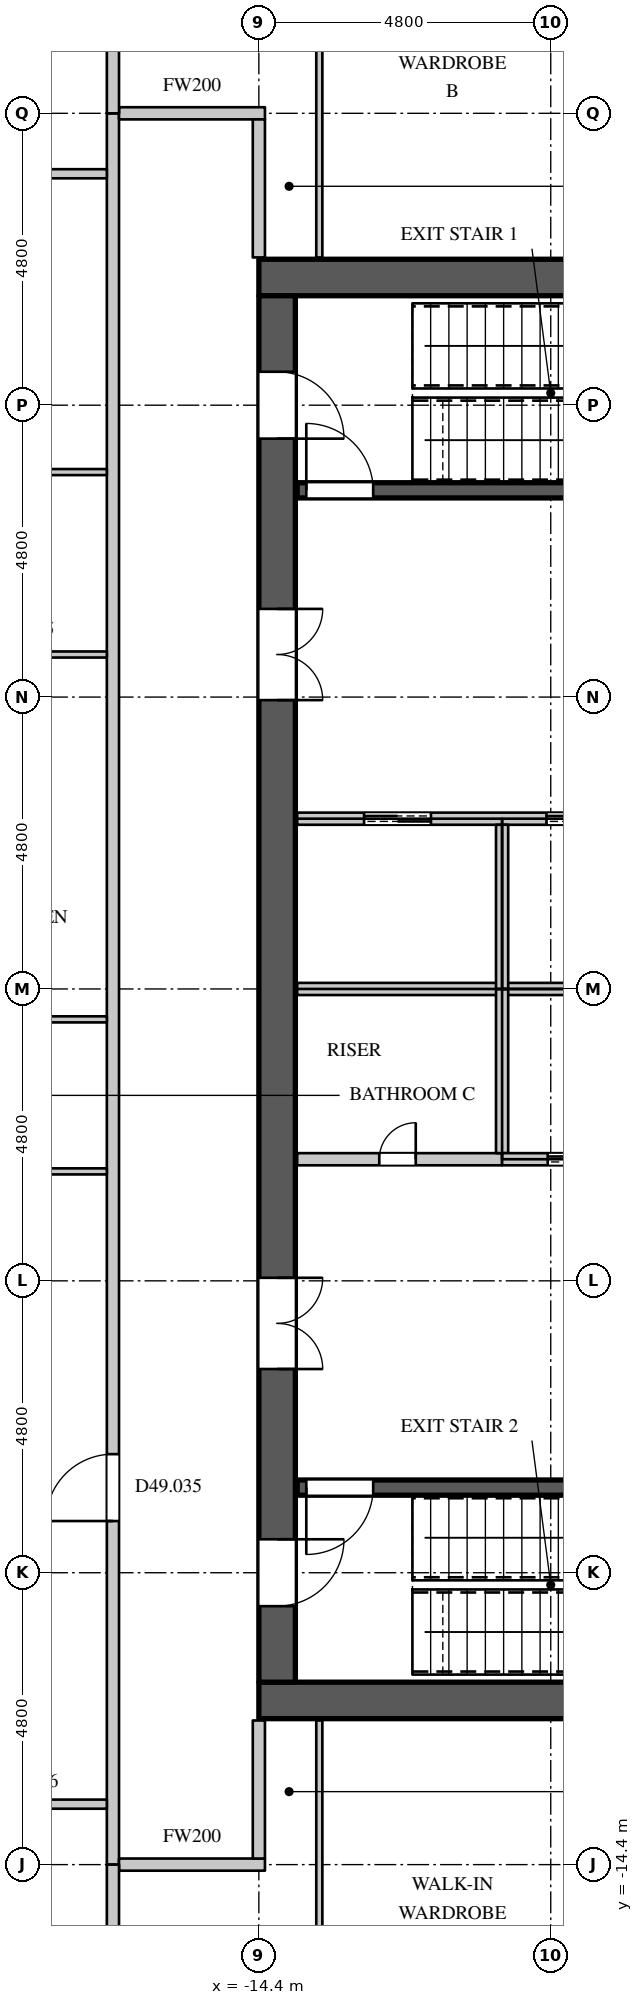
"""IFC4 building model, lengths in metres.
Left out: names, types, materials, properties, quantities, classifications, styles, units other than length and angle.
Written with IfcOpenShell. Run it as: python <this file> out.ifc"""

import sys

from ifc_helpers import new_model, si_unit, direction, frame, frame_2d, origin, place, context, subcontext, project, spatial, rectangle, extrude, element, fill, save


model = new_model("IFC4")
c1 = context("Model", 3, precision=1e-05, world=origin(), true_north=direction((0.0, 1.0)))
c2 = subcontext(c1, "Body", "Model", "MODEL_VIEW")
j1 = project(units=[si_unit("LENGTHUNIT", "METRE"), si_unit("PLANEANGLEUNIT", "RADIAN")], contexts=[c1])
p1 = place(None, origin())
s1 = spatial("IfcSite", under=j1, at=p1, CompositionType="ELEMENT")
p2 = place(p1, origin())
s2 = spatial("IfcBuilding", under=s1, at=p2, CompositionType="ELEMENT")
p3 = place(p2, frame((0.0, 0.0, 213.9)))
s3 = spatial("IfcBuildingStorey", under=s2, at=p3, CompositionType="ELEMENT", Elevation=213.9)
for number, where, z_axis, x_axis in (
    (1, (-14.4, 11.7, 0.0), (0.0, 0.0, 1.0), (1.0, 0.0, 0.0)),
    (2, (-14.4, -11.7, 0.0), (0.0, 0.0, 1.0), (1.0, 0.0, 0.0)),
):
    element("IfcWall", number, at=place(p3, frame(where, z_axis=z_axis, x_axis=x_axis)), inside=s3, PredefinedType="SHEAR", context=c2, shape_type="SweptSolid", body=[
        extrude(rectangle(XDim=28.8, YDim=0.6, at=frame_2d((14.4, 0.0))), origin(), (0.0, 0.0, 1.0), 4.2),
    ])
p4 = place(p3, frame((-14.1, -11.4, 0.0), z_axis=(0.0, 0.0, 1.0), x_axis=(0.0, 1.0, 0.0)))
e3 = element("IfcWall", 3, at=p4, inside=s3, PredefinedType="SHEAR", context=c2, shape_type="SweptSolid", body=[
    extrude(rectangle(XDim=22.8, YDim=0.6, at=frame_2d((11.4, 0.0))), origin(), (0.0, 0.0, 1.0), 4.2),
])
p5 = place(p4, frame((20.45, 0.0, 0.0)))
e4 = element("IfcOpeningElement", 4, at=p5, cuts=e3, PredefinedType="OPENING", context=c2, shape_type="SweptSolid", body=[
    extrude(rectangle(XDim=1.1, YDim=2.2, at=frame_2d((0.55, 1.1))), frame((0.0, 0.31, 0.0), z_axis=(0.0, -1.0, 0.0), x_axis=(1.0, 0.0, 0.0)), (0.0, 0.0, 1.0), 0.62),
])
p6 = place(p4, frame((1.25, 0.0, 0.0)))
e5 = element("IfcOpeningElement", 5, at=p6, cuts=e3, PredefinedType="OPENING", context=c2, shape_type="SweptSolid", body=[
    extrude(rectangle(XDim=1.1, YDim=2.2, at=frame_2d((0.55, 1.1))), frame((0.0, 0.31, 0.0), z_axis=(0.0, -1.0, 0.0), x_axis=(1.0, 0.0, 0.0)), (0.0, 0.0, 1.0), 0.62),
])
p7 = place(p4, frame((16.15, 0.0, 0.0)))
e6 = element("IfcOpeningElement", 6, at=p7, cuts=e3, PredefinedType="OPENING", context=c2, shape_type="SweptSolid", body=[
    extrude(rectangle(XDim=1.5, YDim=2.4, at=frame_2d((0.75, 1.2))), frame((0.0, 0.31, 0.0), z_axis=(0.0, -1.0, 0.0), x_axis=(1.0, 0.0, 0.0)), (0.0, 0.0, 1.0), 0.62),
])
p8 = place(p4, frame((5.15, 0.0, 0.0)))
e7 = element("IfcOpeningElement", 7, at=p8, cuts=e3, PredefinedType="OPENING", context=c2, shape_type="SweptSolid", body=[
    extrude(rectangle(XDim=1.5, YDim=2.4, at=frame_2d((0.75, 1.2))), frame((0.0, 0.31, 0.0), z_axis=(0.0, -1.0, 0.0), x_axis=(1.0, 0.0, 0.0)), (0.0, 0.0, 1.0), 0.62),
])
p9 = place(p3, frame((-16.8, -14.4, 0.0), z_axis=(0.0, 0.0, 1.0), x_axis=(0.0, 1.0, 0.0)))
e8 = element("IfcWall", 8, at=p9, inside=s3, PredefinedType="PARTITIONING", context=c2, shape_type="SweptSolid", body=[
    extrude(rectangle(XDim=28.8, YDim=0.2, at=frame_2d((14.4, 0.0))), origin(), (0.0, 0.0, 1.0), 3.95),
])
p10 = place(p9, frame((5.65, 0.0, 0.0)))
e9 = element("IfcOpeningElement", 9, at=p10, cuts=e8, PredefinedType="OPENING", context=c2, shape_type="SweptSolid", body=[
    extrude(rectangle(XDim=1.1, YDim=2.4, at=frame_2d((0.55, 1.2))), frame((0.0, 0.11, 0.0), z_axis=(0.0, -1.0, 0.0), x_axis=(1.0, 0.0, 0.0)), (0.0, 0.0, 1.0), 0.22),
])
for number, where, z_axis, x_axis in (
    (10, (-16.7, -14.4, 0.0), (0.0, 0.0, 1.0), (1.0, 0.0, 0.0)),
    (11, (-16.7, 14.4, 0.0), (0.0, 0.0, 1.0), (1.0, 0.0, 0.0)),
):
    element("IfcWall", number, at=place(p3, frame(where, z_axis=z_axis, x_axis=x_axis)), inside=s3, PredefinedType="PARTITIONING", context=c2, shape_type="SweptSolid", body=[
        extrude(rectangle(XDim=2.4, YDim=0.2, at=frame_2d((1.2, 0.0))), origin(), (0.0, 0.0, 1.0), 3.95),
    ])
for number, where, z_axis, x_axis in (
    (12, (-14.4, -14.3, 0.0), (0.0, 0.0, 1.0), (0.0, 1.0, 0.0)),
    (13, (-14.4, 12.03, 0.0), (0.0, 0.0, 1.0), (0.0, 1.0, 0.0)),
):
    element("IfcWall", number, at=place(p3, frame(where, z_axis=z_axis, x_axis=x_axis)), inside=s3, PredefinedType="PARTITIONING", context=c2, shape_type="SweptSolid", body=[
        extrude(rectangle(XDim=2.27, YDim=0.2, at=frame_2d((1.135, 0.0))), origin(), (0.0, 0.0, 1.0), 3.95),
    ])
p11 = place(p3, frame((-25.224, -13.406, 0.0), z_axis=(0.0, 0.0, 1.0), x_axis=(1.0, 0.0, 0.0)))
e14 = element("IfcWall", 14, at=p11, inside=s3, PredefinedType="PARTITIONING", context=c2, shape_type="SweptSolid", body=[
    extrude(rectangle(XDim=8.324, YDim=0.15, at=frame_2d((4.162, 0.0))), origin(), (0.0, 0.0, 1.0), 3.95),
])
p12 = place(p11, frame((6.143, 0.0, 0.0)))
e15 = element("IfcOpeningElement", 15, at=p12, cuts=e14, PredefinedType="OPENING", context=c2, shape_type="SweptSolid", body=[
    extrude(rectangle(XDim=0.95, YDim=2.2, at=frame_2d((0.475, 1.1))), frame((0.0, 0.085, 0.0), z_axis=(0.0, -1.0, 0.0), x_axis=(1.0, 0.0, 0.0)), (0.0, 0.0, 1.0), 0.17),
])
p13 = place(p3, frame((-25.224, 13.406, 0.0), z_axis=(0.0, 0.0, 1.0), x_axis=(1.0, 0.0, 0.0)))
e16 = element("IfcWall", 16, at=p13, inside=s3, PredefinedType="PARTITIONING", context=c2, shape_type="SweptSolid", body=[
    extrude(rectangle(XDim=8.324, YDim=0.15, at=frame_2d((4.162, 0.0))), origin(), (0.0, 0.0, 1.0), 3.95),
])
p14 = place(p13, frame((1.793, 0.0, 0.0)))
e17 = element("IfcOpeningElement", 17, at=p14, cuts=e16, PredefinedType="OPENING", context=c2, shape_type="SweptSolid", body=[
    extrude(rectangle(XDim=1.5, YDim=2.2, at=frame_2d((0.75, 1.1))), frame((0.0, 0.085, 0.0), z_axis=(0.0, -1.0, 0.0), x_axis=(1.0, 0.0, 0.0)), (0.0, 0.0, 1.0), 0.17),
])
for number, where, z_axis, x_axis in (
    (18, (-16.8, -19.803, 0.0), (0.0, 0.0, 1.0), (0.0, 1.0, 0.0)),
    (19, (-16.8, 14.4, 0.0), (0.0, 0.0, 1.0), (0.0, 1.0, 0.0)),
):
    element("IfcWall", number, at=place(p3, frame(where, z_axis=z_axis, x_axis=x_axis)), inside=s3, PredefinedType="PARTITIONING", context=c2, shape_type="SweptSolid", body=[
        extrude(rectangle(XDim=5.403, YDim=0.2, at=frame_2d((2.702, 0.0))), origin(), (0.0, 0.0, 1.0), 3.95),
    ])
p15 = place(p3, frame((-13.77, -2.8, 0.0), z_axis=(0.0, 0.0, 1.0), x_axis=(1.0, 0.0, 0.0)))
e20 = element("IfcWall", 20, at=p15, inside=s3, PredefinedType="PARTITIONING", context=c2, shape_type="SweptSolid", body=[
    extrude(rectangle(XDim=3.37, YDim=0.2, at=frame_2d((1.685, 0.0))), origin(), (0.0, 0.0, 1.0), 3.95),
])
p16 = place(p15, frame((1.35, 0.0, 0.0)))
e21 = element("IfcOpeningElement", 21, at=p16, cuts=e20, PredefinedType="OPENING", context=c2, shape_type="SweptSolid", body=[
    extrude(rectangle(XDim=0.6, YDim=2.0, at=frame_2d((0.3, 1.0))), frame((0.0, 0.11, 0.0), z_axis=(0.0, -1.0, 0.0), x_axis=(1.0, 0.0, 0.0)), (0.0, 0.0, 1.0), 0.22),
])
p17 = place(p3, frame((-13.77, 0.0, 0.0), z_axis=(0.0, 0.0, 1.0), x_axis=(1.0, 0.0, 0.0)))
e22 = element("IfcWall", 22, at=p17, inside=s3, PredefinedType="PARTITIONING", context=c2, shape_type="SweptSolid", body=[
    extrude(rectangle(XDim=21.57, YDim=0.2, at=frame_2d((10.785, 0.0))), origin(), (0.0, 0.0, 1.0), 3.95),
])
p18 = place(p3, frame((-13.77, 2.8, 0.0), z_axis=(0.0, 0.0, 1.0), x_axis=(1.0, 0.0, 0.0)))
e23 = element("IfcWall", 23, at=p18, inside=s3, PredefinedType="PARTITIONING", context=c2, shape_type="SweptSolid", body=[
    extrude(rectangle(XDim=5.97, YDim=0.2, at=frame_2d((2.985, 0.0))), origin(), (0.0, 0.0, 1.0), 3.95),
])
p19 = place(p18, frame((1.1, 0.0, 0.0)))
e24 = element("IfcOpeningElement", 24, at=p19, cuts=e23, PredefinedType="OPENING", context=c2, shape_type="SweptSolid", body=[
    extrude(rectangle(XDim=1.1, YDim=2.2, at=frame_2d((0.55, 1.1))), frame((0.0, 0.11, 0.0), z_axis=(0.0, -1.0, 0.0), x_axis=(1.0, 0.0, 0.0)), (0.0, 0.0, 1.0), 0.22),
])
p20 = place(p18, frame((4.1, 0.0, 0.0)))
e25 = element("IfcOpeningElement", 25, at=p20, cuts=e23, PredefinedType="OPENING", context=c2, shape_type="SweptSolid", body=[
    extrude(rectangle(XDim=1.1, YDim=2.2, at=frame_2d((0.55, 1.1))), frame((0.0, 0.11, 0.0), z_axis=(0.0, -1.0, 0.0), x_axis=(1.0, 0.0, 0.0)), (0.0, 0.0, 1.0), 0.22),
])
p21 = place(p3, frame((-10.4, -2.7, 0.0), z_axis=(0.0, 0.0, 1.0), x_axis=(0.0, 1.0, 0.0)))
e26 = element("IfcWall", 26, at=p21, inside=s3, PredefinedType="PARTITIONING", context=c2, shape_type="SweptSolid", body=[
    extrude(rectangle(XDim=2.7, YDim=0.2, at=frame_2d((1.35, 0.0))), origin(), (0.0, 0.0, 1.0), 3.95),
])
p22 = place(p3, frame((-10.4, -2.8, 0.0), z_axis=(0.0, 0.0, 1.0), x_axis=(1.0, 0.0, 0.0)))
e27 = element("IfcWall", 27, at=p22, inside=s3, PredefinedType="PARTITIONING", context=c2, shape_type="SweptSolid", body=[
    extrude(rectangle(XDim=18.2, YDim=0.2, at=frame_2d((9.1, 0.0))), origin(), (0.0, 0.0, 1.0), 3.95),
])
p23 = place(p22, frame((0.75, 0.0, 0.0)))
e28 = element("IfcOpeningElement", 28, at=p23, cuts=e27, PredefinedType="OPENING", context=c2, shape_type="SweptSolid", body=[
    extrude(rectangle(XDim=1.1, YDim=2.2, at=frame_2d((0.55, 1.1))), frame((0.0, 0.11, 0.0), z_axis=(0.0, -1.0, 0.0), x_axis=(1.0, 0.0, 0.0)), (0.0, 0.0, 1.0), 0.22),
])
p24 = place(p22, frame((3.35, 0.0, 0.0)))
e29 = element("IfcOpeningElement", 29, at=p24, cuts=e27, PredefinedType="OPENING", context=c2, shape_type="SweptSolid", body=[
    extrude(rectangle(XDim=1.1, YDim=2.2, at=frame_2d((0.55, 1.1))), frame((0.0, 0.11, 0.0), z_axis=(0.0, -1.0, 0.0), x_axis=(1.0, 0.0, 0.0)), (0.0, 0.0, 1.0), 0.22),
])
p25 = place(p22, frame((5.95, 0.0, 0.0)))
e30 = element("IfcOpeningElement", 30, at=p25, cuts=e27, PredefinedType="OPENING", context=c2, shape_type="SweptSolid", body=[
    extrude(rectangle(XDim=1.1, YDim=2.2, at=frame_2d((0.55, 1.1))), frame((0.0, 0.11, 0.0), z_axis=(0.0, -1.0, 0.0), x_axis=(1.0, 0.0, 0.0)), (0.0, 0.0, 1.0), 0.22),
])
p26 = place(p22, frame((8.55, 0.0, 0.0)))
e31 = element("IfcOpeningElement", 31, at=p26, cuts=e27, PredefinedType="OPENING", context=c2, shape_type="SweptSolid", body=[
    extrude(rectangle(XDim=1.1, YDim=2.2, at=frame_2d((0.55, 1.1))), frame((0.0, 0.11, 0.0), z_axis=(0.0, -1.0, 0.0), x_axis=(1.0, 0.0, 0.0)), (0.0, 0.0, 1.0), 0.22),
])
p27 = place(p22, frame((11.15, 0.0, 0.0)))
e32 = element("IfcOpeningElement", 32, at=p27, cuts=e27, PredefinedType="OPENING", context=c2, shape_type="SweptSolid", body=[
    extrude(rectangle(XDim=1.1, YDim=2.2, at=frame_2d((0.55, 1.1))), frame((0.0, 0.11, 0.0), z_axis=(0.0, -1.0, 0.0), x_axis=(1.0, 0.0, 0.0)), (0.0, 0.0, 1.0), 0.22),
])
p28 = place(p22, frame((13.75, 0.0, 0.0)))
e33 = element("IfcOpeningElement", 33, at=p28, cuts=e27, PredefinedType="OPENING", context=c2, shape_type="SweptSolid", body=[
    extrude(rectangle(XDim=1.1, YDim=2.2, at=frame_2d((0.55, 1.1))), frame((0.0, 0.11, 0.0), z_axis=(0.0, -1.0, 0.0), x_axis=(1.0, 0.0, 0.0)), (0.0, 0.0, 1.0), 0.22),
])
p29 = place(p22, frame((16.35, 0.0, 0.0)))
e34 = element("IfcOpeningElement", 34, at=p29, cuts=e27, PredefinedType="OPENING", context=c2, shape_type="SweptSolid", body=[
    extrude(rectangle(XDim=1.1, YDim=2.2, at=frame_2d((0.55, 1.1))), frame((0.0, 0.11, 0.0), z_axis=(0.0, -1.0, 0.0), x_axis=(1.0, 0.0, 0.0)), (0.0, 0.0, 1.0), 0.22),
])
p30 = place(p3, frame((-10.4, 0.0, 0.0), z_axis=(0.0, 0.0, 1.0), x_axis=(0.0, 1.0, 0.0)))
e35 = element("IfcWall", 35, at=p30, inside=s3, PredefinedType="PARTITIONING", context=c2, shape_type="SweptSolid", body=[
    extrude(rectangle(XDim=2.7, YDim=0.2, at=frame_2d((1.35, 0.0))), origin(), (0.0, 0.0, 1.0), 3.95),
])
p31 = place(p3, frame((-13.77, -8.2, 0.0), z_axis=(0.0, 0.0, 1.0), x_axis=(1.0, 0.0, 0.0)))
e36 = element("IfcWall", 36, at=p31, inside=s3, PredefinedType="SHEAR", context=c2, shape_type="SweptSolid", body=[
    extrude(rectangle(XDim=8.495, YDim=0.25, at=frame_2d((4.248, 0.0))), origin(), (0.0, 0.0, 1.0), 3.95),
])
p32 = place(p31, frame((0.15, 0.0, 0.0)))
e37 = element("IfcOpeningElement", 37, at=p32, cuts=e36, PredefinedType="OPENING", context=c2, shape_type="SweptSolid", body=[
    extrude(rectangle(XDim=1.1, YDim=2.2, at=frame_2d((0.55, 1.1))), frame((0.0, 0.135, 0.0), z_axis=(0.0, -1.0, 0.0), x_axis=(1.0, 0.0, 0.0)), (0.0, 0.0, 1.0), 0.27),
])
p33 = place(p3, frame((-13.77, 8.2, 0.0), z_axis=(0.0, 0.0, 1.0), x_axis=(1.0, 0.0, 0.0)))
e38 = element("IfcWall", 38, at=p33, inside=s3, PredefinedType="SHEAR", context=c2, shape_type="SweptSolid", body=[
    extrude(rectangle(XDim=8.495, YDim=0.25, at=frame_2d((4.248, 0.0))), origin(), (0.0, 0.0, 1.0), 3.95),
])
p34 = place(p33, frame((0.15, 0.0, 0.0)))
e39 = element("IfcOpeningElement", 39, at=p34, cuts=e38, PredefinedType="OPENING", context=c2, shape_type="SweptSolid", body=[
    extrude(rectangle(XDim=1.1, YDim=2.2, at=frame_2d((0.55, 1.1))), frame((0.0, 0.135, 0.0), z_axis=(0.0, -1.0, 0.0), x_axis=(1.0, 0.0, 0.0)), (0.0, 0.0, 1.0), 0.27),
])
p35 = place(p3, frame((-20.65, -3.0, 0.0), z_axis=(0.0, 0.0, 1.0), x_axis=(1.0, 0.0, 0.0)))
e40 = element("IfcWall", 40, at=p35, inside=s3, PredefinedType="PARTITIONING", context=c2, shape_type="SweptSolid", body=[
    extrude(rectangle(XDim=3.75, YDim=0.1, at=frame_2d((1.875, 0.0))), origin(), (0.0, 0.0, 1.0), 3.95),
])
p36 = place(p35, frame((1.45, 0.0, 0.0)))
e41 = element("IfcOpeningElement", 41, at=p36, cuts=e40, PredefinedType="OPENING", context=c2, shape_type="SweptSolid", body=[
    extrude(rectangle(XDim=0.9, YDim=2.2, at=frame_2d((0.45, 1.1))), frame((0.0, 0.06, 0.0), z_axis=(0.0, -1.0, 0.0), x_axis=(1.0, 0.0, 0.0)), (0.0, 0.0, 1.0), 0.12),
])
p37 = place(p3, frame((-20.625, -0.5, 0.0), z_axis=(0.0, 0.0, 1.0), x_axis=(1.0, 0.0, 0.0)))
e42 = element("IfcWall", 42, at=p37, inside=s3, PredefinedType="PARTITIONING", context=c2, shape_type="SweptSolid", body=[
    extrude(rectangle(XDim=3.725, YDim=0.1, at=frame_2d((1.863, 0.0))), origin(), (0.0, 0.0, 1.0), 3.95),
])
p38 = place(p3, frame((-19.675, 5.5, 0.0), z_axis=(0.0, 0.0, 1.0), x_axis=(1.0, 0.0, 0.0)))
e43 = element("IfcWall", 43, at=p38, inside=s3, PredefinedType="PARTITIONING", context=c2, shape_type="SweptSolid", body=[
    extrude(rectangle(XDim=2.775, YDim=0.1, at=frame_2d((1.388, 0.0))), origin(), (0.0, 0.0, 1.0), 3.95),
])
p39 = place(p38, frame((0.9, 0.0, 0.0)))
e44 = element("IfcOpeningElement", 44, at=p39, cuts=e43, PredefinedType="OPENING", context=c2, shape_type="SweptSolid", body=[
    extrude(rectangle(XDim=0.9, YDim=2.2, at=frame_2d((0.45, 1.1))), frame((0.0, 0.06, 0.0), z_axis=(0.0, -1.0, 0.0), x_axis=(1.0, 0.0, 0.0)), (0.0, 0.0, 1.0), 0.12),
])
p40 = place(p3, frame((-19.675, 8.5, 0.0), z_axis=(0.0, 0.0, 1.0), x_axis=(1.0, 0.0, 0.0)))
e45 = element("IfcWall", 45, at=p40, inside=s3, PredefinedType="PARTITIONING", context=c2, shape_type="SweptSolid", body=[
    extrude(rectangle(XDim=2.775, YDim=0.1, at=frame_2d((1.388, 0.0))), origin(), (0.0, 0.0, 1.0), 3.95),
])
for number, where, z_axis, x_axis in (
    (46, (-13.406, -16.6, 0.0), (0.0, 0.0, 1.0), (0.0, 1.0, 0.0)),
    (47, (-13.406, 12.03, 0.0), (0.0, 0.0, 1.0), (0.0, 1.0, 0.0)),
):
    element("IfcWall", number, at=place(p3, frame(where, z_axis=z_axis, x_axis=x_axis)), inside=s3, PredefinedType="PARTITIONING", context=c2, shape_type="SweptSolid", body=[
        extrude(rectangle(XDim=4.57, YDim=0.1, at=frame_2d((2.285, 0.0))), origin(), (0.0, 0.0, 1.0), 3.3),
    ])
p41 = place(p16, origin())
e48 = element("IfcDoor", 48, at=p41, inside=s3, OperationType="SINGLE_SWING_RIGHT", PredefinedType="DOOR", context=c2, shape_type="SweptSolid", body=[
    extrude(rectangle(XDim=0.6, YDim=2.0, at=frame_2d((0.3, 1.0))), frame((0.0, 0.025, 0.0), z_axis=(0.0, -1.0, 0.0), x_axis=(1.0, 0.0, 0.0)), (0.0, 0.0, 1.0), 0.05),
])
fill(e21, e48)
p42 = place(p19, origin())
e49 = element("IfcDoor", 49, at=p42, inside=s3, OperationType="DOUBLE_DOOR_SLIDING", PredefinedType="DOOR", context=c2, shape_type="SweptSolid", body=[
    extrude(rectangle(XDim=1.1, YDim=2.2, at=frame_2d((0.55, 1.1))), frame((0.0, 0.025, 0.0), z_axis=(0.0, -1.0, 0.0), x_axis=(1.0, 0.0, 0.0)), (0.0, 0.0, 1.0), 0.05),
])
fill(e24, e49)
p43 = place(p20, origin())
e50 = element("IfcDoor", 50, at=p43, inside=s3, OperationType="DOUBLE_DOOR_SLIDING", PredefinedType="DOOR", context=c2, shape_type="SweptSolid", body=[
    extrude(rectangle(XDim=1.1, YDim=2.2, at=frame_2d((0.55, 1.1))), frame((0.0, 0.025, 0.0), z_axis=(0.0, -1.0, 0.0), x_axis=(1.0, 0.0, 0.0)), (0.0, 0.0, 1.0), 0.05),
])
fill(e25, e50)
p44 = place(p23, origin())
e51 = element("IfcDoor", 51, at=p44, inside=s3, OperationType="DOUBLE_DOOR_SLIDING", PredefinedType="DOOR", context=c2, shape_type="SweptSolid", body=[
    extrude(rectangle(XDim=1.1, YDim=2.2, at=frame_2d((0.55, 1.1))), frame((0.0, 0.025, 0.0), z_axis=(0.0, -1.0, 0.0), x_axis=(1.0, 0.0, 0.0)), (0.0, 0.0, 1.0), 0.05),
])
fill(e28, e51)
p45 = place(p34, origin())
e52 = element("IfcDoor", 52, at=p45, inside=s3, OperationType="SINGLE_SWING_LEFT", PredefinedType="DOOR", context=c2, shape_type="SweptSolid", body=[
    extrude(rectangle(XDim=1.1, YDim=2.2, at=frame_2d((0.55, 1.1))), frame((0.0, 0.025, 0.0), z_axis=(0.0, -1.0, 0.0), x_axis=(1.0, 0.0, 0.0)), (0.0, 0.0, 1.0), 0.05),
])
fill(e39, e52)
p46 = place(p32, origin())
e53 = element("IfcDoor", 53, at=p46, inside=s3, OperationType="SINGLE_SWING_RIGHT", PredefinedType="DOOR", context=c2, shape_type="SweptSolid", body=[
    extrude(rectangle(XDim=1.1, YDim=2.2, at=frame_2d((0.55, 1.1))), frame((0.0, 0.025, 0.0), z_axis=(0.0, -1.0, 0.0), x_axis=(1.0, 0.0, 0.0)), (0.0, 0.0, 1.0), 0.05),
])
fill(e37, e53)
p47 = place(p5, origin())
e54 = element("IfcDoor", 54, at=p47, inside=s3, OperationType="SINGLE_SWING_RIGHT", PredefinedType="DOOR", context=c2, shape_type="SweptSolid", body=[
    extrude(rectangle(XDim=1.1, YDim=2.2, at=frame_2d((0.55, 1.1))), frame((0.0, -0.245, 0.0), z_axis=(0.0, -1.0, 0.0), x_axis=(1.0, 0.0, 0.0)), (0.0, 0.0, 1.0), 0.05),
])
fill(e4, e54)
p48 = place(p6, origin())
e55 = element("IfcDoor", 55, at=p48, inside=s3, OperationType="SINGLE_SWING_LEFT", PredefinedType="DOOR", context=c2, shape_type="SweptSolid", body=[
    extrude(rectangle(XDim=1.1, YDim=2.2, at=frame_2d((0.55, 1.1))), frame((0.0, -0.245, 0.0), z_axis=(0.0, -1.0, 0.0), x_axis=(1.0, 0.0, 0.0)), (0.0, 0.0, 1.0), 0.05),
])
fill(e5, e55)
p49 = place(p7, origin())
e56 = element("IfcDoor", 56, at=p49, inside=s3, OperationType="DOUBLE_DOOR_SINGLE_SWING", PredefinedType="DOOR", context=c2, shape_type="SweptSolid", body=[
    extrude(rectangle(XDim=1.5, YDim=2.4, at=frame_2d((0.75, 1.2))), frame((0.0, -0.245, 0.0), z_axis=(0.0, -1.0, 0.0), x_axis=(1.0, 0.0, 0.0)), (0.0, 0.0, 1.0), 0.05),
])
fill(e6, e56)
p50 = place(p8, origin())
e57 = element("IfcDoor", 57, at=p50, inside=s3, OperationType="DOUBLE_DOOR_SINGLE_SWING", PredefinedType="DOOR", context=c2, shape_type="SweptSolid", body=[
    extrude(rectangle(XDim=1.5, YDim=2.4, at=frame_2d((0.75, 1.2))), frame((0.0, -0.245, 0.0), z_axis=(0.0, -1.0, 0.0), x_axis=(1.0, 0.0, 0.0)), (0.0, 0.0, 1.0), 0.05),
])
fill(e7, e57)
p51 = place(p10, origin())
e58 = element("IfcDoor", 58, at=p51, inside=s3, OperationType="SINGLE_SWING_LEFT", PredefinedType="DOOR", context=c2, shape_type="SweptSolid", body=[
    extrude(rectangle(XDim=1.1, YDim=2.4, at=frame_2d((0.55, 1.2))), frame((0.0, 0.025, 0.0), z_axis=(0.0, -1.0, 0.0), x_axis=(1.0, 0.0, 0.0)), (0.0, 0.0, 1.0), 0.05),
])
fill(e9, e58)
save(model, sys.argv[1])
